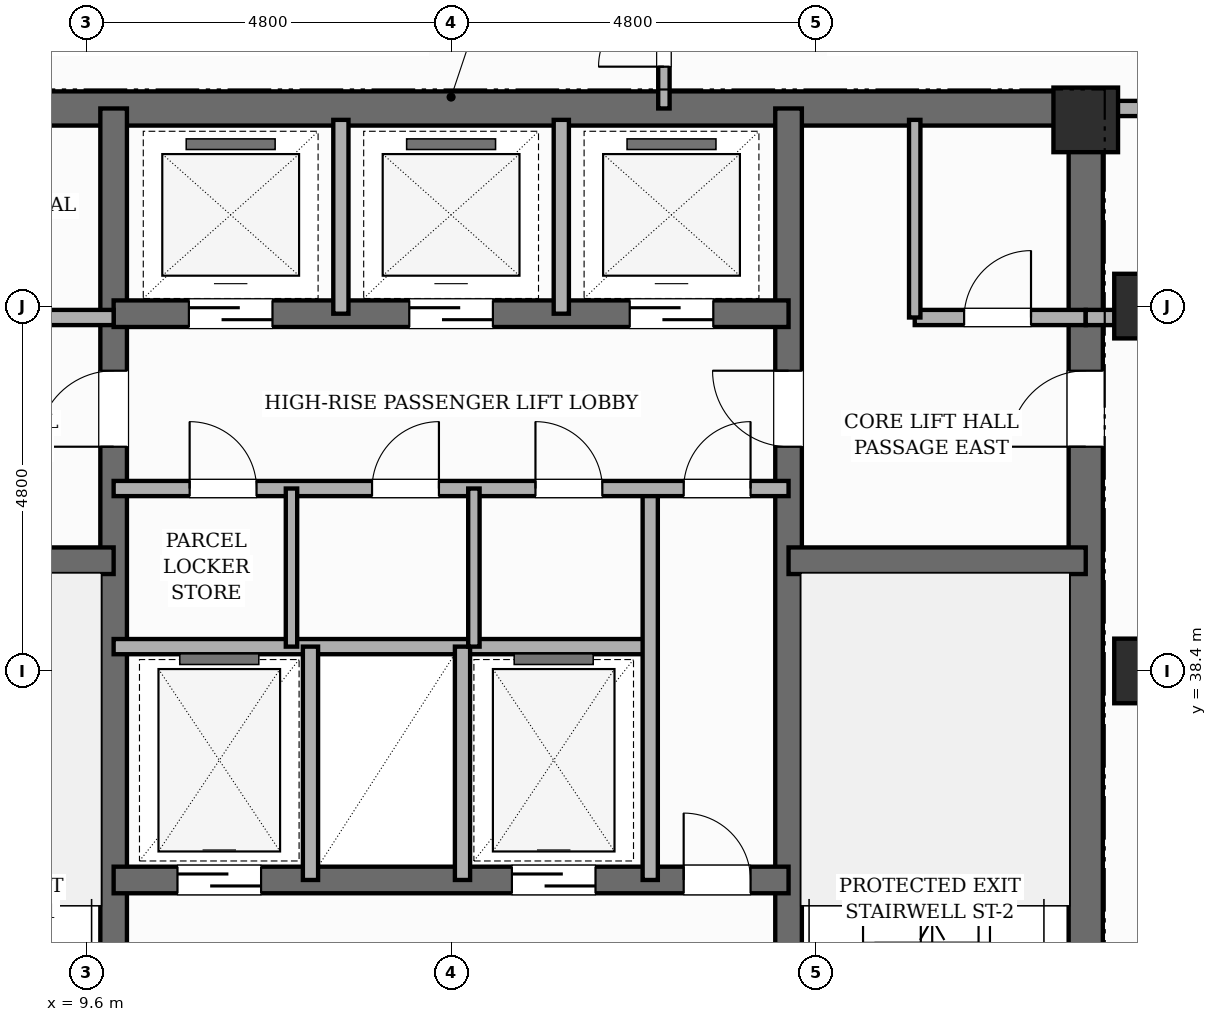
"""IFC4 building model, lengths in metres.
Left out: names, types, materials, properties, quantities, classifications, styles, units other than length and angle.
Written with IfcOpenShell. Run it as: python <this file> out.ifc"""

import sys

from ifc_helpers import new_model, si_unit, direction, frame, frame_2d, origin, origin_2d, place, context, subcontext, project, spatial, rectangle, extrude, element, fill, save


model = new_model("IFC4")
c1 = context("Model", 3, precision=1e-05, world=origin(), true_north=direction((0.0, 1.0)))
c2 = subcontext(c1, "Body", "Model", "MODEL_VIEW")
j1 = project(units=[si_unit("LENGTHUNIT", "METRE"), si_unit("PLANEANGLEUNIT", "RADIAN")], contexts=[c1])
p1 = place(None, origin())
s1 = spatial("IfcSite", under=j1, at=p1, CompositionType="ELEMENT")
p2 = place(p1, origin())
s2 = spatial("IfcBuilding", under=s1, at=p2, CompositionType="ELEMENT")
p3 = place(p2, frame((0.0, 0.0, 211.0)))
s3 = spatial("IfcBuildingStorey", under=s2, at=p3, CompositionType="ELEMENT", Elevation=211.0)
p4 = place(p3, frame((22.75, 30.675, 0.0), z_axis=(0.0, 0.0, 1.0), x_axis=(0.0, 1.0, 0.0)))
e1 = element("IfcWall", 1, at=p4, inside=s3, PredefinedType="SHEAR", context=c2, shape_type="SweptSolid", body=[
    extrude(rectangle(XDim=15.35, YDim=0.45, at=frame_2d((7.675, 0.0))), origin(), (0.0, 0.0, 1.0), 3.6),
])
p5 = place(p4, frame((10.675, 0.0, 0.0)))
e2 = element("IfcOpeningElement", 2, at=p5, cuts=e1, PredefinedType="OPENING", context=c2, shape_type="SweptSolid", body=[
    extrude(rectangle(XDim=1.0, YDim=2.15, at=frame_2d((0.5, 1.075))), frame((0.0, 0.235, 0.0), z_axis=(0.0, -1.0, 0.0), x_axis=(1.0, 0.0, 0.0)), (0.0, 0.0, 1.0), 0.47),
])
p6 = place(p3, frame((6.05, 45.8, 0.0), z_axis=(0.0, 0.0, 1.0), x_axis=(1.0, 0.0, 0.0)))
e3 = element("IfcWall", 3, at=p6, inside=s3, PredefinedType="SHEAR", context=c2, shape_type="SweptSolid", body=[
    extrude(rectangle(XDim=16.7, YDim=0.45, at=frame_2d((8.35, 0.0))), origin(), (0.0, 0.0, 1.0), 3.6),
])
p7 = place(p3, frame((9.96, 30.9, 0.0), z_axis=(0.0, 0.0, 1.0), x_axis=(0.0, 1.0, 0.0)))
e4 = element("IfcWall", 4, at=p7, inside=s3, PredefinedType="SHEAR", context=c2, shape_type="SweptSolid", body=[
    extrude(rectangle(XDim=14.9, YDim=0.35, at=frame_2d((7.45, 0.0))), origin(), (0.0, 0.0, 1.0), 3.6),
])
p8 = place(p7, frame((0.65, 0.0, 0.0)))
e5 = element("IfcOpeningElement", 5, at=p8, cuts=e4, PredefinedType="OPENING", context=c2, shape_type="SweptSolid", body=[
    extrude(rectangle(XDim=0.95, YDim=2.1, at=frame_2d((0.475, 1.05))), frame((0.0, 0.185, 0.0), z_axis=(0.0, -1.0, 0.0), x_axis=(1.0, 0.0, 0.0)), (0.0, 0.0, 1.0), 0.37),
])
p9 = place(p7, frame((10.45, 0.0, 0.0)))
e6 = element("IfcOpeningElement", 6, at=p9, cuts=e4, PredefinedType="OPENING", context=c2, shape_type="SweptSolid", body=[
    extrude(rectangle(XDim=1.0, YDim=2.15, at=frame_2d((0.5, 1.075))), frame((0.0, 0.185, 0.0), z_axis=(0.0, -1.0, 0.0), x_axis=(1.0, 0.0, 0.0)), (0.0, 0.0, 1.0), 0.37),
])
p10 = place(p3, frame((18.84, 30.9, 0.0), z_axis=(0.0, 0.0, 1.0), x_axis=(0.0, 1.0, 0.0)))
e7 = element("IfcWall", 7, at=p10, inside=s3, PredefinedType="SHEAR", context=c2, shape_type="SweptSolid", body=[
    extrude(rectangle(XDim=14.9, YDim=0.35, at=frame_2d((7.45, 0.0))), origin(), (0.0, 0.0, 1.0), 3.6),
])
p11 = place(p10, frame((0.65, 0.0, 0.0)))
e8 = element("IfcOpeningElement", 8, at=p11, cuts=e7, PredefinedType="OPENING", context=c2, shape_type="SweptSolid", body=[
    extrude(rectangle(XDim=0.95, YDim=2.1, at=frame_2d((0.475, 1.05))), frame((0.0, 0.185, 0.0), z_axis=(0.0, -1.0, 0.0), x_axis=(1.0, 0.0, 0.0)), (0.0, 0.0, 1.0), 0.37),
])
p12 = place(p10, frame((10.45, 0.0, 0.0)))
e9 = element("IfcOpeningElement", 9, at=p12, cuts=e7, PredefinedType="OPENING", context=c2, shape_type="SweptSolid", body=[
    extrude(rectangle(XDim=1.0, YDim=2.15, at=frame_2d((0.5, 1.075))), frame((0.0, 0.185, 0.0), z_axis=(0.0, -1.0, 0.0), x_axis=(1.0, 0.0, 0.0)), (0.0, 0.0, 1.0), 0.37),
])
for number, where, z_axis, x_axis in (
    (10, (6.05, 39.85, 0.0), (0.0, 0.0, 1.0), (1.0, 0.0, 0.0)),
    (11, (18.84, 39.85, 0.0), (0.0, 0.0, 1.0), (1.0, 0.0, 0.0)),
):
    element("IfcWall", number, at=place(p3, frame(where, z_axis=z_axis, x_axis=x_axis)), inside=s3, PredefinedType="SHEAR", context=c2, shape_type="SweptSolid", body=[
        extrude(rectangle(XDim=3.91, YDim=0.35, at=frame_2d((1.955, 0.0))), origin(), (0.0, 0.0, 1.0), 3.6),
    ])
p13 = place(p3, frame((9.96, 35.65, 0.0), z_axis=(0.0, 0.0, 1.0), x_axis=(1.0, 0.0, 0.0)))
e12 = element("IfcWall", 12, at=p13, inside=s3, PredefinedType="SHEAR", context=c2, shape_type="SweptSolid", body=[
    extrude(rectangle(XDim=8.88, YDim=0.35, at=frame_2d((4.44, 0.0))), origin(), (0.0, 0.0, 1.0), 3.6),
])
p14 = place(p13, frame((0.84, 0.0, 0.0)))
e13 = element("IfcOpeningElement", 13, at=p14, cuts=e12, PredefinedType="OPENING", context=c2, shape_type="SweptSolid", body=[
    extrude(rectangle(XDim=1.1, YDim=2.15, at=frame_2d((0.55, 1.075))), frame((0.0, 0.185, 0.0), z_axis=(0.0, -1.0, 0.0), x_axis=(1.0, 0.0, 0.0)), (0.0, 0.0, 1.0), 0.37),
])
p15 = place(p13, frame((5.24, 0.0, 0.0)))
e14 = element("IfcOpeningElement", 14, at=p15, cuts=e12, PredefinedType="OPENING", context=c2, shape_type="SweptSolid", body=[
    extrude(rectangle(XDim=1.1, YDim=2.15, at=frame_2d((0.55, 1.075))), frame((0.0, 0.185, 0.0), z_axis=(0.0, -1.0, 0.0), x_axis=(1.0, 0.0, 0.0)), (0.0, 0.0, 1.0), 0.37),
])
p16 = place(p13, frame((7.5, 0.0, 0.0)))
e15 = element("IfcOpeningElement", 15, at=p16, cuts=e12, PredefinedType="OPENING", context=c2, shape_type="SweptSolid", body=[
    extrude(rectangle(XDim=0.88, YDim=2.1, at=frame_2d((0.44, 1.05))), frame((0.0, 0.185, 0.0), z_axis=(0.0, -1.0, 0.0), x_axis=(1.0, 0.0, 0.0)), (0.0, 0.0, 1.0), 0.37),
])
p17 = place(p3, frame((9.96, 43.1, 0.0), z_axis=(0.0, 0.0, 1.0), x_axis=(1.0, 0.0, 0.0)))
e16 = element("IfcWall", 16, at=p17, inside=s3, PredefinedType="SHEAR", context=c2, shape_type="SweptSolid", body=[
    extrude(rectangle(XDim=8.88, YDim=0.35, at=frame_2d((4.44, 0.0))), origin(), (0.0, 0.0, 1.0), 3.6),
])
p18 = place(p17, frame((0.99, 0.0, 0.0)))
e17 = element("IfcOpeningElement", 17, at=p18, cuts=e16, PredefinedType="OPENING", context=c2, shape_type="SweptSolid", body=[
    extrude(rectangle(XDim=1.1, YDim=2.15, at=frame_2d((0.55, 1.075))), frame((0.0, 0.185, 0.0), z_axis=(0.0, -1.0, 0.0), x_axis=(1.0, 0.0, 0.0)), (0.0, 0.0, 1.0), 0.37),
])
p19 = place(p17, frame((3.89, 0.0, 0.0)))
e18 = element("IfcOpeningElement", 18, at=p19, cuts=e16, PredefinedType="OPENING", context=c2, shape_type="SweptSolid", body=[
    extrude(rectangle(XDim=1.1, YDim=2.15, at=frame_2d((0.55, 1.075))), frame((0.0, 0.185, 0.0), z_axis=(0.0, -1.0, 0.0), x_axis=(1.0, 0.0, 0.0)), (0.0, 0.0, 1.0), 0.37),
])
p20 = place(p17, frame((6.79, 0.0, 0.0)))
e19 = element("IfcOpeningElement", 19, at=p20, cuts=e16, PredefinedType="OPENING", context=c2, shape_type="SweptSolid", body=[
    extrude(rectangle(XDim=1.1, YDim=2.15, at=frame_2d((0.55, 1.075))), frame((0.0, 0.185, 0.0), z_axis=(0.0, -1.0, 0.0), x_axis=(1.0, 0.0, 0.0)), (0.0, 0.0, 1.0), 0.37),
])
for number, where, z_axis, x_axis in (
    (20, (22.75, 45.65, 0.0), (0.0, 0.0, 1.0), (1.0, 0.0, 0.0)),
    (21, (23.55, 38.4, 0.0), (0.0, 0.0, 1.0), (1.0, 0.0, 0.0)),
    (22, (23.55, 43.2, 0.0), (0.0, 0.0, 1.0), (1.0, 0.0, 0.0)),
):
    element("IfcColumn", number, at=place(p3, frame(where, z_axis=z_axis, x_axis=x_axis)), inside=s3, PredefinedType="COLUMN", context=c2, shape_type="SweptSolid", body=[
        extrude(rectangle(XDim=0.85, YDim=0.85, at=origin_2d()), origin(), (0.0, 0.0, 1.0), 3.6),
    ])
p21 = place(p3, frame((9.96, 38.72, 0.0), z_axis=(0.0, 0.0, 1.0), x_axis=(1.0, 0.0, 0.0)))
e23 = element("IfcWall", 23, at=p21, inside=s3, PredefinedType="POLYGONAL", context=c2, shape_type="SweptSolid", body=[
    extrude(rectangle(XDim=7.06, YDim=0.2, at=frame_2d((3.53, 0.0))), origin(), (0.0, 0.0, 1.0), 3.38),
])
for number, where, z_axis, x_axis in (
    (24, (12.55, 35.65, 0.0), (0.0, 0.0, 1.0), (0.0, 1.0, 0.0)),
    (25, (14.55, 35.65, 0.0), (0.0, 0.0, 1.0), (0.0, 1.0, 0.0)),
):
    element("IfcWall", number, at=place(p3, frame(where, z_axis=z_axis, x_axis=x_axis)), inside=s3, PredefinedType="POLYGONAL", context=c2, shape_type="SweptSolid", body=[
        extrude(rectangle(XDim=3.07, YDim=0.2, at=frame_2d((1.535, 0.0))), origin(), (0.0, 0.0, 1.0), 3.38),
    ])
p22 = place(p3, frame((17.02, 35.65, 0.0), z_axis=(0.0, 0.0, 1.0), x_axis=(0.0, 1.0, 0.0)))
e26 = element("IfcWall", 26, at=p22, inside=s3, PredefinedType="POLYGONAL", context=c2, shape_type="SweptSolid", body=[
    extrude(rectangle(XDim=5.15, YDim=0.2, at=frame_2d((2.575, 0.0))), origin(), (0.0, 0.0, 1.0), 3.38),
])
p23 = place(p3, frame((9.96, 40.8, 0.0), z_axis=(0.0, 0.0, 1.0), x_axis=(1.0, 0.0, 0.0)))
e27 = element("IfcWall", 27, at=p23, inside=s3, PredefinedType="POLYGONAL", context=c2, shape_type="SweptSolid", body=[
    extrude(rectangle(XDim=8.88, YDim=0.2, at=frame_2d((4.44, 0.0))), origin(), (0.0, 0.0, 1.0), 3.38),
])
p24 = place(p23, frame((7.5, 0.0, 0.0)))
e28 = element("IfcOpeningElement", 28, at=p24, cuts=e27, PredefinedType="OPENING", context=c2, shape_type="SweptSolid", body=[
    extrude(rectangle(XDim=0.88, YDim=2.1, at=frame_2d((0.44, 1.05))), frame((0.0, 0.11, 0.0), z_axis=(0.0, -1.0, 0.0), x_axis=(1.0, 0.0, 0.0)), (0.0, 0.0, 1.0), 0.22),
])
p25 = place(p23, frame((1.0, 0.0, 0.0)))
e29 = element("IfcOpeningElement", 29, at=p25, cuts=e27, PredefinedType="OPENING", context=c2, shape_type="SweptSolid", body=[
    extrude(rectangle(XDim=0.88, YDim=2.1, at=frame_2d((0.44, 1.05))), frame((0.0, 0.11, 0.0), z_axis=(0.0, -1.0, 0.0), x_axis=(1.0, 0.0, 0.0)), (0.0, 0.0, 1.0), 0.22),
])
p26 = place(p23, frame((3.4, 0.0, 0.0)))
e30 = element("IfcOpeningElement", 30, at=p26, cuts=e27, PredefinedType="OPENING", context=c2, shape_type="SweptSolid", body=[
    extrude(rectangle(XDim=0.88, YDim=2.1, at=frame_2d((0.44, 1.05))), frame((0.0, 0.11, 0.0), z_axis=(0.0, -1.0, 0.0), x_axis=(1.0, 0.0, 0.0)), (0.0, 0.0, 1.0), 0.22),
])
p27 = place(p23, frame((5.55, 0.0, 0.0)))
e31 = element("IfcOpeningElement", 31, at=p27, cuts=e27, PredefinedType="OPENING", context=c2, shape_type="SweptSolid", body=[
    extrude(rectangle(XDim=0.88, YDim=2.1, at=frame_2d((0.44, 1.05))), frame((0.0, 0.11, 0.0), z_axis=(0.0, -1.0, 0.0), x_axis=(1.0, 0.0, 0.0)), (0.0, 0.0, 1.0), 0.22),
])
p28 = place(p3, frame((20.5, 43.05, 0.0), z_axis=(0.0, 0.0, 1.0), x_axis=(1.0, 0.0, 0.0)))
e32 = element("IfcWall", 32, at=p28, inside=s3, PredefinedType="POLYGONAL", context=c2, shape_type="SweptSolid", body=[
    extrude(rectangle(XDim=2.25, YDim=0.2, at=frame_2d((1.125, 0.0))), origin(), (0.0, 0.0, 1.0), 2.66),
])
p29 = place(p28, frame((0.65, 0.0, 0.0)))
e33 = element("IfcOpeningElement", 33, at=p29, cuts=e32, PredefinedType="OPENING", context=c2, shape_type="SweptSolid", body=[
    extrude(rectangle(XDim=0.88, YDim=2.1, at=frame_2d((0.44, 1.05))), frame((0.0, 0.11, 0.0), z_axis=(0.0, -1.0, 0.0), x_axis=(1.0, 0.0, 0.0)), (0.0, 0.0, 1.0), 0.22),
])
p30 = place(p3, frame((6.05, 43.05, 0.0), z_axis=(0.0, 0.0, 1.0), x_axis=(1.0, 0.0, 0.0)))
e34 = element("IfcWall", 34, at=p30, inside=s3, PredefinedType="POLYGONAL", context=c2, shape_type="SweptSolid", body=[
    extrude(rectangle(XDim=3.91, YDim=0.2, at=frame_2d((1.955, 0.0))), origin(), (0.0, 0.0, 1.0), 2.66),
])
p31 = place(p30, frame((1.35, 0.0, 0.0)))
e35 = element("IfcOpeningElement", 35, at=p31, cuts=e34, PredefinedType="OPENING", context=c2, shape_type="SweptSolid", body=[
    extrude(rectangle(XDim=0.88, YDim=2.1, at=frame_2d((0.44, 1.05))), frame((0.0, 0.11, 0.0), z_axis=(0.0, -1.0, 0.0), x_axis=(1.0, 0.0, 0.0)), (0.0, 0.0, 1.0), 0.22),
])
for number, where, z_axis, x_axis in (
    (36, (12.95, 43.1, 0.0), (0.0, 0.0, 1.0), (0.0, 1.0, 0.0)),
    (37, (15.85, 43.1, 0.0), (0.0, 0.0, 1.0), (0.0, 1.0, 0.0)),
):
    element("IfcWall", number, at=place(p3, frame(where, z_axis=z_axis, x_axis=x_axis)), inside=s3, PredefinedType="POLYGONAL", context=c2, shape_type="SweptSolid", body=[
        extrude(rectangle(XDim=2.55, YDim=0.2, at=frame_2d((1.275, 0.0))), origin(), (0.0, 0.0, 1.0), 3.38),
    ])
for number, where, z_axis, x_axis in (
    (38, (12.3, 38.72, 0.0), (0.0, 0.0, 1.0), (0.0, 1.0, 0.0)),
    (39, (14.7, 38.72, 0.0), (0.0, 0.0, 1.0), (0.0, 1.0, 0.0)),
):
    element("IfcWall", number, at=place(p3, frame(where, z_axis=z_axis, x_axis=x_axis)), inside=s3, PredefinedType="PARTITIONING", context=c2, shape_type="SweptSolid", body=[
        extrude(rectangle(XDim=2.08, YDim=0.15, at=frame_2d((1.04, 0.0))), origin(), (0.0, 0.0, 1.0), 3.38),
    ])
p32 = place(p3, frame((20.5, 43.05, 0.0), z_axis=(0.0, 0.0, 1.0), x_axis=(0.0, 1.0, 0.0)))
e40 = element("IfcWall", 40, at=p32, inside=s3, PredefinedType="PARTITIONING", context=c2, shape_type="SweptSolid", body=[
    extrude(rectangle(XDim=2.6, YDim=0.15, at=frame_2d((1.3, 0.0))), origin(), (0.0, 0.0, 1.0), 3.38),
])
p33 = place(p3, frame((22.75, 45.8, 0.0), z_axis=(0.0, 0.0, 1.0), x_axis=(1.0, 0.0, 0.0)))
e41 = element("IfcWall", 41, at=p33, inside=s3, PredefinedType="PARTITIONING", context=c2, shape_type="SweptSolid", body=[
    extrude(rectangle(XDim=2.75, YDim=0.2, at=frame_2d((1.375, 0.0))), origin(), (0.0, 0.0, 1.0), 3.38),
])
p34 = place(p3, frame((17.2, 45.8, 0.0), z_axis=(0.0, 0.0, 1.0), x_axis=(0.0, 1.0, 0.0)))
e42 = element("IfcWall", 42, at=p34, inside=s3, PredefinedType="PARTITIONING", context=c2, shape_type="SweptSolid", body=[
    extrude(rectangle(XDim=1.92, YDim=0.15, at=frame_2d((0.96, 0.0))), origin(), (0.0, 0.0, 1.0), 3.38),
])
p35 = place(p34, frame((0.55, 0.0, 0.0)))
e43 = element("IfcOpeningElement", 43, at=p35, cuts=e42, PredefinedType="OPENING", context=c2, shape_type="SweptSolid", body=[
    extrude(rectangle(XDim=0.86, YDim=2.1, at=frame_2d((0.43, 1.05))), frame((0.0, 0.085, 0.0), z_axis=(0.0, -1.0, 0.0), x_axis=(1.0, 0.0, 0.0)), (0.0, 0.0, 1.0), 0.17),
])
p36 = place(p3, frame((22.75, 43.05, 0.0), z_axis=(0.0, 0.0, 1.0), x_axis=(1.0, 0.0, 0.0)))
e44 = element("IfcWall", 44, at=p36, inside=s3, PredefinedType="PARTITIONING", context=c2, shape_type="SweptSolid", body=[
    extrude(rectangle(XDim=2.75, YDim=0.2, at=frame_2d((1.375, 0.0))), origin(), (0.0, 0.0, 1.0), 2.66),
])
p37 = place(p14, origin())
e45 = element("IfcDoor", 45, at=p37, inside=s3, OperationType="SLIDING_TO_LEFT", PredefinedType="DOOR", context=c2, shape_type="SweptSolid", body=[
    extrude(rectangle(XDim=1.1, YDim=2.15, at=frame_2d((0.55, 1.075))), frame((0.0, 0.025, 0.0), z_axis=(0.0, -1.0, 0.0), x_axis=(1.0, 0.0, 0.0)), (0.0, 0.0, 1.0), 0.05),
])
fill(e13, e45)
p38 = place(p15, origin())
e46 = element("IfcDoor", 46, at=p38, inside=s3, OperationType="SLIDING_TO_RIGHT", PredefinedType="DOOR", context=c2, shape_type="SweptSolid", body=[
    extrude(rectangle(XDim=1.1, YDim=2.15, at=frame_2d((0.55, 1.075))), frame((0.0, 0.025, 0.0), z_axis=(0.0, -1.0, 0.0), x_axis=(1.0, 0.0, 0.0)), (0.0, 0.0, 1.0), 0.05),
])
fill(e14, e46)
p39 = place(p16, origin())
e47 = element("IfcDoor", 47, at=p39, inside=s3, OperationType="SINGLE_SWING_LEFT", PredefinedType="DOOR", context=c2, shape_type="SweptSolid", body=[
    extrude(rectangle(XDim=0.88, YDim=2.1, at=frame_2d((0.44, 1.05))), frame((0.0, 0.025, 0.0), z_axis=(0.0, -1.0, 0.0), x_axis=(1.0, 0.0, 0.0)), (0.0, 0.0, 1.0), 0.05),
])
fill(e15, e47)
p40 = place(p24, origin())
e48 = element("IfcDoor", 48, at=p40, inside=s3, OperationType="SINGLE_SWING_RIGHT", PredefinedType="DOOR", context=c2, shape_type="SweptSolid", body=[
    extrude(rectangle(XDim=0.88, YDim=2.1, at=frame_2d((0.44, 1.05))), frame((0.0, 0.025, 0.0), z_axis=(0.0, -1.0, 0.0), x_axis=(1.0, 0.0, 0.0)), (0.0, 0.0, 1.0), 0.05),
])
fill(e28, e48)
p41 = place(p18, origin())
e49 = element("IfcDoor", 49, at=p41, inside=s3, OperationType="SLIDING_TO_LEFT", PredefinedType="DOOR", context=c2, shape_type="SweptSolid", body=[
    extrude(rectangle(XDim=1.1, YDim=2.15, at=frame_2d((0.55, 1.075))), frame((0.0, 0.025, 0.0), z_axis=(0.0, -1.0, 0.0), x_axis=(1.0, 0.0, 0.0)), (0.0, 0.0, 1.0), 0.05),
])
fill(e17, e49)
p42 = place(p19, origin())
e50 = element("IfcDoor", 50, at=p42, inside=s3, OperationType="SLIDING_TO_RIGHT", PredefinedType="DOOR", context=c2, shape_type="SweptSolid", body=[
    extrude(rectangle(XDim=1.1, YDim=2.15, at=frame_2d((0.55, 1.075))), frame((0.0, 0.025, 0.0), z_axis=(0.0, -1.0, 0.0), x_axis=(1.0, 0.0, 0.0)), (0.0, 0.0, 1.0), 0.05),
])
fill(e18, e50)
p43 = place(p20, origin())
e51 = element("IfcDoor", 51, at=p43, inside=s3, OperationType="SLIDING_TO_LEFT", PredefinedType="DOOR", context=c2, shape_type="SweptSolid", body=[
    extrude(rectangle(XDim=1.1, YDim=2.15, at=frame_2d((0.55, 1.075))), frame((0.0, 0.025, 0.0), z_axis=(0.0, -1.0, 0.0), x_axis=(1.0, 0.0, 0.0)), (0.0, 0.0, 1.0), 0.05),
])
fill(e19, e51)
p44 = place(p9, origin())
e52 = element("IfcDoor", 52, at=p44, inside=s3, OperationType="SINGLE_SWING_LEFT", PredefinedType="DOOR", context=c2, shape_type="SweptSolid", body=[
    extrude(rectangle(XDim=1.0, YDim=2.15, at=frame_2d((0.5, 1.075))), frame((0.0, 0.025, 0.0), z_axis=(0.0, -1.0, 0.0), x_axis=(1.0, 0.0, 0.0)), (0.0, 0.0, 1.0), 0.05),
])
fill(e6, e52)
p45 = place(p12, origin())
e53 = element("IfcDoor", 53, at=p45, inside=s3, OperationType="SINGLE_SWING_RIGHT", PredefinedType="DOOR", context=c2, shape_type="SweptSolid", body=[
    extrude(rectangle(XDim=1.0, YDim=2.15, at=frame_2d((0.5, 1.075))), frame((0.0, 0.025, 0.0), z_axis=(0.0, -1.0, 0.0), x_axis=(1.0, 0.0, 0.0)), (0.0, 0.0, 1.0), 0.05),
])
fill(e9, e53)
p46 = place(p5, origin())
e54 = element("IfcDoor", 54, at=p46, inside=s3, OperationType="SINGLE_SWING_LEFT", PredefinedType="DOOR", context=c2, shape_type="SweptSolid", body=[
    extrude(rectangle(XDim=1.0, YDim=2.15, at=frame_2d((0.5, 1.075))), frame((0.0, 0.025, 0.0), z_axis=(0.0, -1.0, 0.0), x_axis=(1.0, 0.0, 0.0)), (0.0, 0.0, 1.0), 0.05),
])
fill(e2, e54)
p47 = place(p25, origin())
e55 = element("IfcDoor", 55, at=p47, inside=s3, OperationType="SINGLE_SWING_LEFT", PredefinedType="DOOR", context=c2, shape_type="SweptSolid", body=[
    extrude(rectangle(XDim=0.88, YDim=2.1, at=frame_2d((0.44, 1.05))), frame((0.0, 0.025, 0.0), z_axis=(0.0, -1.0, 0.0), x_axis=(1.0, 0.0, 0.0)), (0.0, 0.0, 1.0), 0.05),
])
fill(e29, e55)
p48 = place(p26, origin())
e56 = element("IfcDoor", 56, at=p48, inside=s3, OperationType="SINGLE_SWING_RIGHT", PredefinedType="DOOR", context=c2, shape_type="SweptSolid", body=[
    extrude(rectangle(XDim=0.88, YDim=2.1, at=frame_2d((0.44, 1.05))), frame((0.0, 0.025, 0.0), z_axis=(0.0, -1.0, 0.0), x_axis=(1.0, 0.0, 0.0)), (0.0, 0.0, 1.0), 0.05),
])
fill(e30, e56)
p49 = place(p27, origin())
e57 = element("IfcDoor", 57, at=p49, inside=s3, OperationType="SINGLE_SWING_LEFT", PredefinedType="DOOR", context=c2, shape_type="SweptSolid", body=[
    extrude(rectangle(XDim=0.88, YDim=2.1, at=frame_2d((0.44, 1.05))), frame((0.0, 0.025, 0.0), z_axis=(0.0, -1.0, 0.0), x_axis=(1.0, 0.0, 0.0)), (0.0, 0.0, 1.0), 0.05),
])
fill(e31, e57)
p50 = place(p29, origin())
e58 = element("IfcDoor", 58, at=p50, inside=s3, OperationType="SINGLE_SWING_RIGHT", PredefinedType="DOOR", context=c2, shape_type="SweptSolid", body=[
    extrude(rectangle(XDim=0.88, YDim=2.1, at=frame_2d((0.44, 1.05))), frame((0.0, 0.025, 0.0), z_axis=(0.0, -1.0, 0.0), x_axis=(1.0, 0.0, 0.0)), (0.0, 0.0, 1.0), 0.05),
])
fill(e33, e58)
p51 = place(p35, origin())
e59 = element("IfcDoor", 59, at=p51, inside=s3, OperationType="SINGLE_SWING_LEFT", PredefinedType="DOOR", context=c2, shape_type="SweptSolid", body=[
    extrude(rectangle(XDim=0.86, YDim=2.1, at=frame_2d((0.43, 1.05))), frame((0.0, 0.025, 0.0), z_axis=(0.0, -1.0, 0.0), x_axis=(1.0, 0.0, 0.0)), (0.0, 0.0, 1.0), 0.05),
])
fill(e43, e59)
save(model, sys.argv[1])
